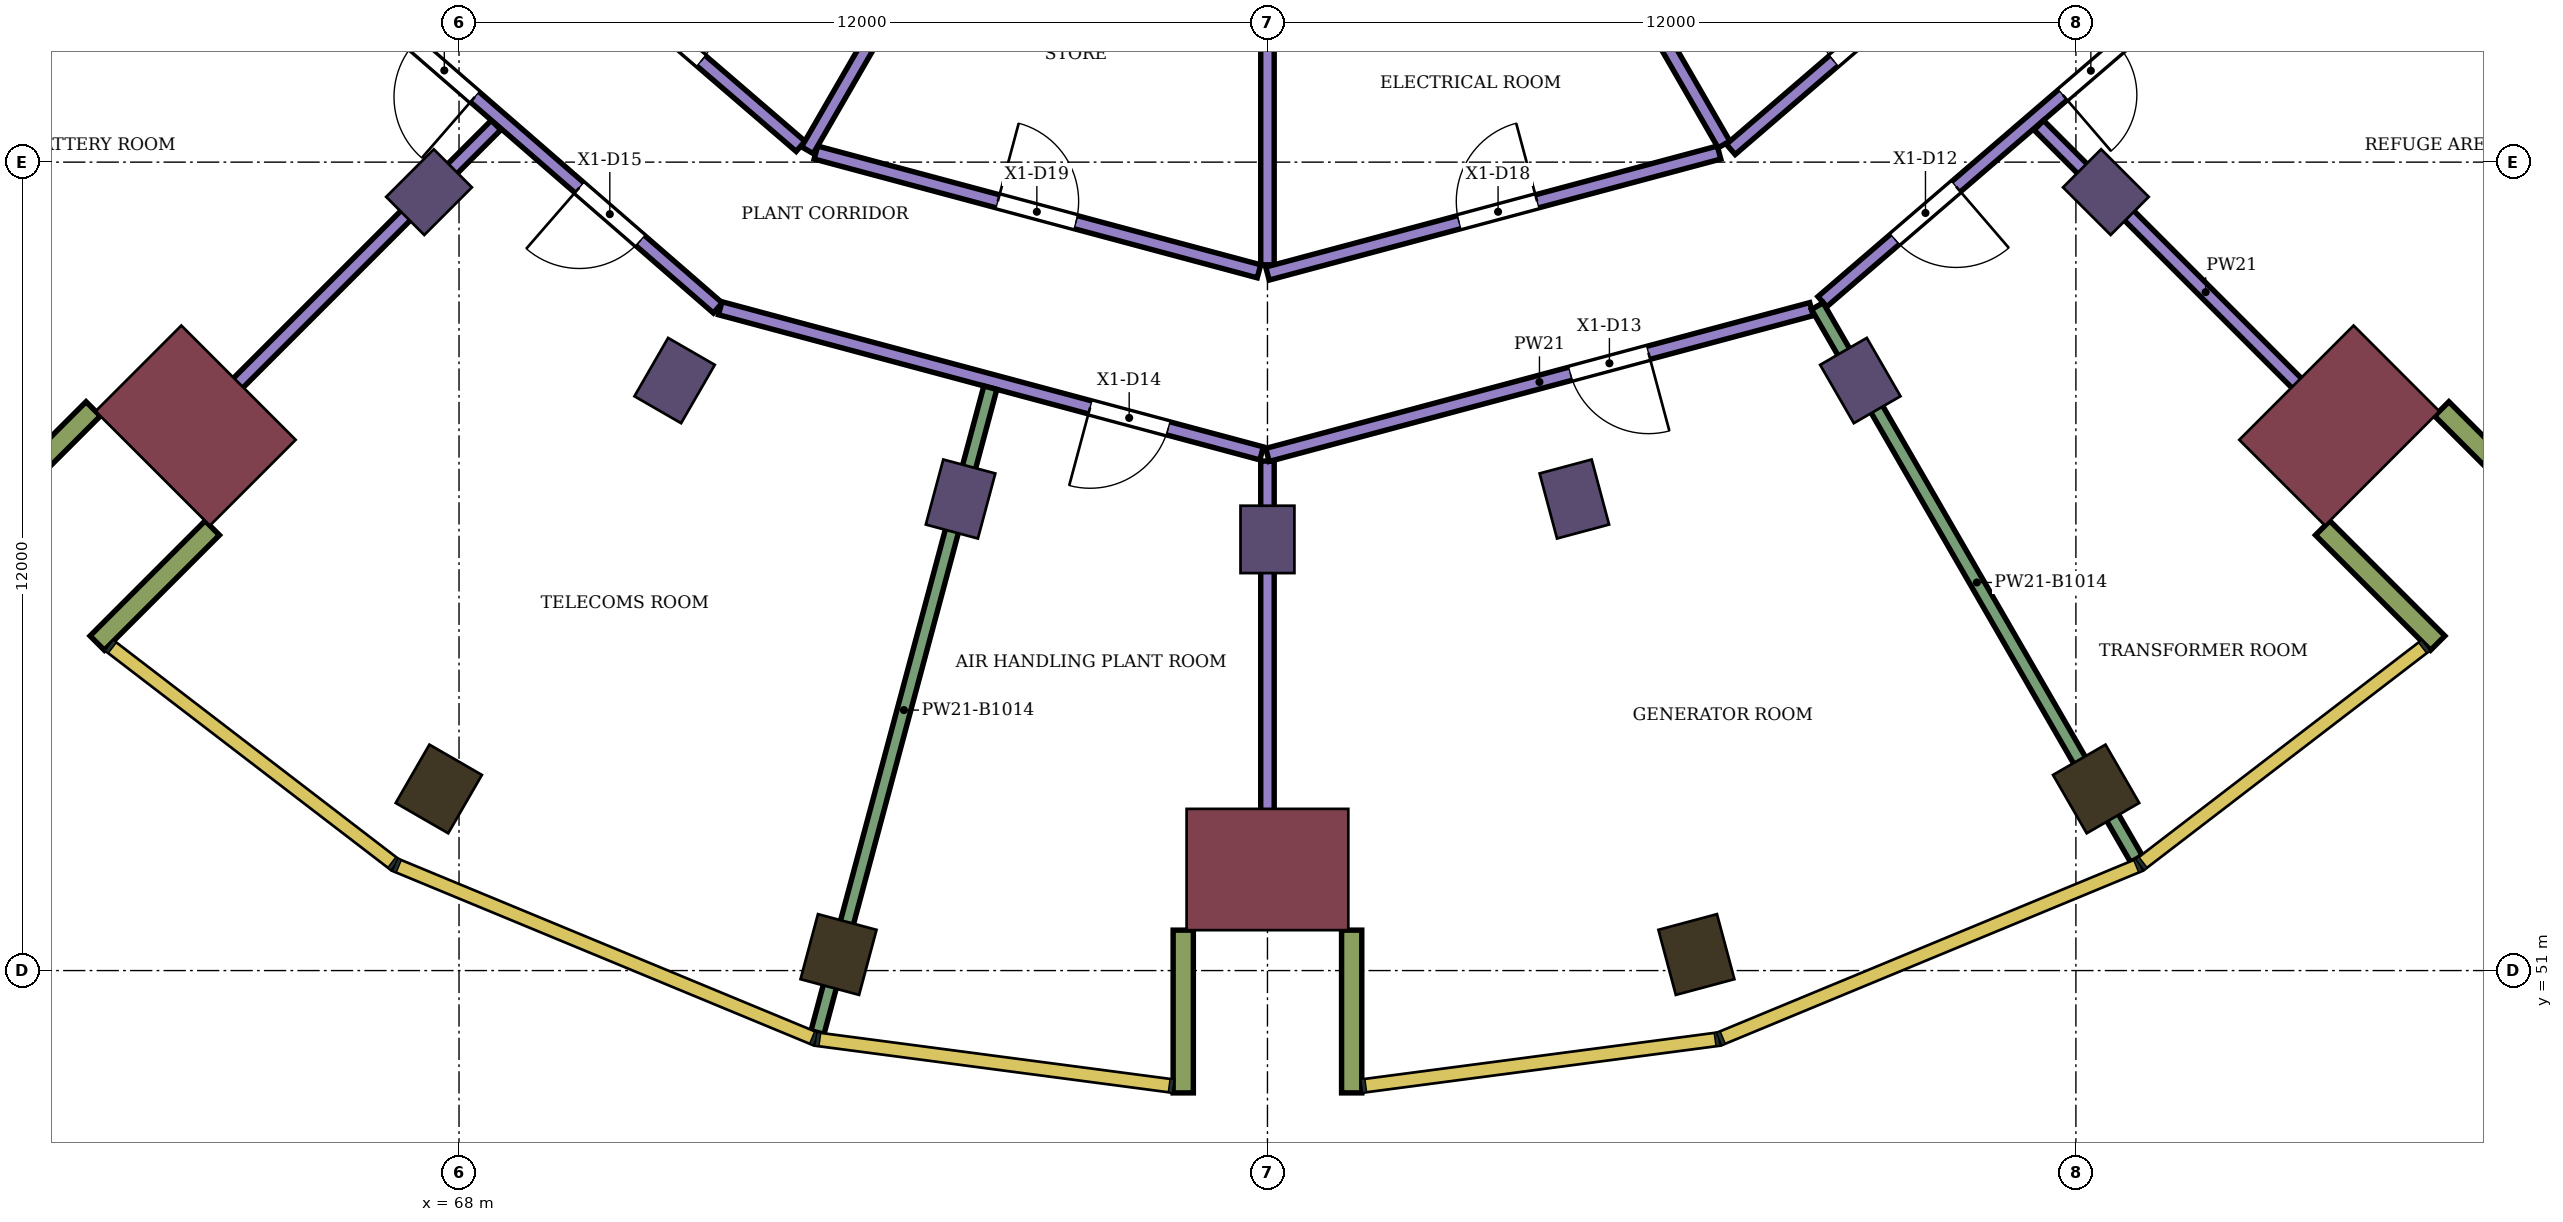
"""IFC4 building model, lengths in metres.
Left out: names, types, materials, properties, quantities, classifications, styles, units other than length and angle.
Written with IfcOpenShell. Run it as: python <this file> out.ifc"""

import sys

from ifc_helpers import new_model, si_unit, direction, frame, frame_2d, origin, origin_2d, place, context, subcontext, project, spatial, rectangle, extrude, element, fill, save


model = new_model("IFC4")
c1 = context("Model", 3, precision=1e-05, world=origin(), true_north=direction((0.0, 1.0)))
c2 = subcontext(c1, "Body", "Model", "MODEL_VIEW")
j1 = project(units=[si_unit("LENGTHUNIT", "METRE"), si_unit("PLANEANGLEUNIT", "RADIAN")], contexts=[c1])
p1 = place(None, origin())
s1 = spatial("IfcSite", under=j1, at=p1, CompositionType="ELEMENT")
p2 = place(p1, origin())
s2 = spatial("IfcBuilding", under=s1, at=p2, CompositionType="ELEMENT")
p3 = place(p2, frame((0.0, 0.0, 109.0)))
s3 = spatial("IfcBuildingStorey", under=s2, at=p3, CompositionType="ELEMENT", Elevation=109.0)
for number, where, z_axis, x_axis in (
    (1, (67.7, 53.696, 0.0), (0.0, 0.0, 1.0), (-0.5, -0.866, 0.0)),
    (2, (73.633, 51.238, 0.0), (0.0, 0.0, 1.0), (-0.259, -0.966, 0.0)),
    (3, (86.367, 51.238, 0.0), (0.0, 0.0, 1.0), (0.259, -0.966, 0.0)),
    (4, (92.3, 53.696, 0.0), (0.0, 0.0, 1.0), (0.5, -0.866, 0.0)),
):
    element("IfcColumn", number, at=place(p3, frame(where, z_axis=z_axis, x_axis=x_axis)), inside=s3, PredefinedType="COLUMN", context=c2, shape_type="SweptSolid", body=[
        extrude(rectangle(XDim=1.0, YDim=0.9, at=origin_2d()), origin(), (0.0, 0.0, 1.0), 5.6),
    ])
for number, where, z_axis, x_axis in (
    (5, (67.555, 62.555, 0.0), (0.0, 0.0, 1.0), (-0.707, -0.707, 0.0)),
    (6, (71.2, 59.758, 0.0), (0.0, 0.0, 1.0), (-0.5, -0.866, 0.0)),
    (7, (75.445, 58.0, 0.0), (0.0, 0.0, 1.0), (-0.259, -0.966, 0.0)),
    (8, (80.0, 57.4, 0.0), (0.0, 0.0, 1.0), (0.0, -1.0, 0.0)),
    (9, (84.555, 58.0, 0.0), (0.0, 0.0, 1.0), (0.259, -0.966, 0.0)),
    (10, (88.8, 59.758, 0.0), (0.0, 0.0, 1.0), (0.5, -0.866, 0.0)),
    (11, (92.445, 62.555, 0.0), (0.0, 0.0, 1.0), (0.707, -0.707, 0.0)),
):
    element("IfcColumn", number, at=place(p3, frame(where, z_axis=z_axis, x_axis=x_axis)), inside=s3, PredefinedType="COLUMN", context=c2, shape_type="SweptSolid", body=[
        extrude(rectangle(XDim=1.0, YDim=0.8, at=origin_2d()), origin(), (0.0, 0.0, 1.0), 5.6),
    ])
for number, where, z_axis, x_axis in (
    (12, (64.09, 59.09, 0.0), (0.0, 0.0, 1.0), (-0.707, -0.707, 0.0)),
    (13, (80.0, 52.5, 0.0), (0.0, 0.0, 1.0), (0.0, -1.0, 0.0)),
    (14, (95.91, 59.09, 0.0), (0.0, 0.0, 1.0), (0.707, -0.707, 0.0)),
):
    element("IfcColumn", number, at=place(p3, frame(where, z_axis=z_axis, x_axis=x_axis)), inside=s3, PredefinedType="COLUMN", context=c2, shape_type="SweptSolid", body=[
        extrude(rectangle(XDim=1.8, YDim=2.4, at=origin_2d()), origin(), (0.0, 0.0, 1.0), 5.6),
    ])
for number, where, z_axis, x_axis in (
    (15, (62.57, 59.338, 0.0), (0.0, 0.0, 1.0), (-0.707, -0.707, 0.0)),
    (16, (64.338, 57.57, 0.0), (0.0, 0.0, 1.0), (-0.707, -0.707, 0.0)),
    (17, (78.75, 51.6, 0.0), (0.0, 0.0, 1.0), (0.0, -1.0, 0.0)),
    (18, (81.25, 51.6, 0.0), (0.0, 0.0, 1.0), (0.0, -1.0, 0.0)),
    (19, (95.662, 57.57, 0.0), (0.0, 0.0, 1.0), (0.707, -0.707, 0.0)),
    (20, (97.43, 59.338, 0.0), (0.0, 0.0, 1.0), (0.707, -0.707, 0.0)),
):
    element("IfcWall", number, at=place(p3, frame(where, z_axis=z_axis, x_axis=x_axis)), inside=s3, PredefinedType="NOTDEFINED", context=c2, shape_type="SweptSolid", body=[
        extrude(rectangle(XDim=2.416, YDim=0.3, at=frame_2d((1.208, 0.0))), origin(), (0.0, 0.0, 1.0), 5.6),
    ])
p4 = place(p3, frame((63.596, 58.596, 0.0), z_axis=(0.0, 0.0, 1.0), x_axis=(0.707106781187, 0.707106781187, 0.0)))
e21 = element("IfcWall", 21, at=p4, inside=s3, PredefinedType="PARTITIONING", context=c2, shape_type="SweptSolid", body=[
    extrude(rectangle(XDim=7.005, YDim=0.2, at=frame_2d((3.502, 0.0))), origin(), (0.0, 0.0, 1.0), 5.15),
])
p5 = place(p3, frame((66.922, 65.108, 0.0), z_axis=(0.0, 0.0, 1.0), x_axis=(0.755027260387, -0.655693400968, 0.0)))
e22 = element("IfcWall", 22, at=p5, inside=s3, PredefinedType="PARTITIONING", context=c2, shape_type="SweptSolid", body=[
    extrude(rectangle(XDim=6.516, YDim=0.2, at=frame_2d((3.258, 0.0))), origin(), (0.0, 0.0, 1.0), 5.15),
])
p6 = place(p5, frame((3.792, 0.0, 0.0)))
e23 = element("IfcOpeningElement", 23, at=p6, cuts=e22, PredefinedType="OPENING", context=c2, shape_type="SweptSolid", body=[
    extrude(rectangle(XDim=1.2, YDim=2.4, at=frame_2d((0.6, 1.2))), frame((0.0, 0.11, 0.0), z_axis=(0.0, -1.0, 0.0), x_axis=(1.0, 0.0, 0.0)), (0.0, 0.0, 1.0), 0.22),
])
p7 = place(p5, frame((0.539, 0.0, 0.0)))
e24 = element("IfcOpeningElement", 24, at=p7, cuts=e22, PredefinedType="OPENING", context=c2, shape_type="SweptSolid", body=[
    extrude(rectangle(XDim=1.2, YDim=2.4, at=frame_2d((0.6, 1.2))), frame((0.0, 0.11, 0.0), z_axis=(0.0, -1.0, 0.0), x_axis=(1.0, 0.0, 0.0)), (0.0, 0.0, 1.0), 0.22),
])
p8 = place(p3, frame((69.158, 66.6, 0.0), z_axis=(0.0, 0.0, 1.0), x_axis=(0.758063092745, -0.652181222835, 0.0)))
e25 = element("IfcWall", 25, at=p8, inside=s3, PredefinedType="PARTITIONING", context=c2, shape_type="SweptSolid", body=[
    extrude(rectangle(XDim=5.16, YDim=0.2, at=frame_2d((2.58, 0.0))), origin(), (0.0, 0.0, 1.0), 5.15),
])
p9 = place(p8, frame((2.015, 0.0, 0.0)))
e26 = element("IfcOpeningElement", 26, at=p9, cuts=e25, PredefinedType="OPENING", context=c2, shape_type="SweptSolid", body=[
    extrude(rectangle(XDim=1.2, YDim=2.4, at=frame_2d((0.6, 1.2))), frame((0.0, 0.11, 0.0), z_axis=(0.0, -1.0, 0.0), x_axis=(1.0, 0.0, 0.0)), (0.0, 0.0, 1.0), 0.22),
])
p10 = place(p3, frame((71.877, 60.831, 0.0), z_axis=(0.0, 0.0, 1.0), x_axis=(0.965893155099, -0.258940944876, 0.0)))
e27 = element("IfcWall", 27, at=p10, inside=s3, PredefinedType="PARTITIONING", context=c2, shape_type="SweptSolid", body=[
    extrude(rectangle(XDim=8.32, YDim=0.2, at=frame_2d((4.16, 0.0))), origin(), (0.0, 0.0, 1.0), 5.15),
])
p11 = place(p10, frame((5.685, 0.0, 0.0)))
e28 = element("IfcOpeningElement", 28, at=p11, cuts=e27, PredefinedType="OPENING", context=c2, shape_type="SweptSolid", body=[
    extrude(rectangle(XDim=1.2, YDim=2.4, at=frame_2d((0.6, 1.2))), frame((0.0, 0.11, 0.0), z_axis=(0.0, -1.0, 0.0), x_axis=(1.0, 0.0, 0.0)), (0.0, 0.0, 1.0), 0.22),
])
p12 = place(p3, frame((73.297, 63.143, 0.0), z_axis=(0.0, 0.0, 1.0), x_axis=(0.965899714105, -0.258916477443, 0.0)))
e29 = element("IfcWall", 29, at=p12, inside=s3, PredefinedType="PARTITIONING", context=c2, shape_type="SweptSolid", body=[
    extrude(rectangle(XDim=6.81, YDim=0.2, at=frame_2d((3.405, 0.0))), origin(), (0.0, 0.0, 1.0), 5.15),
])
p13 = place(p12, frame((2.796, 0.0, 0.0)))
e30 = element("IfcOpeningElement", 30, at=p13, cuts=e29, PredefinedType="OPENING", context=c2, shape_type="SweptSolid", body=[
    extrude(rectangle(XDim=1.2, YDim=2.4, at=frame_2d((0.6, 1.2))), frame((0.0, 0.11, 0.0), z_axis=(0.0, -1.0, 0.0), x_axis=(1.0, 0.0, 0.0)), (0.0, 0.0, 1.0), 0.22),
])
p14 = place(p3, frame((73.172, 63.177, 0.0), z_axis=(0.0, 0.0, 1.0), x_axis=(0.500080872431, 0.86597870703, 0.0)))
e31 = element("IfcWall", 31, at=p14, inside=s3, PredefinedType="PARTITIONING", context=c2, shape_type="SweptSolid", body=[
    extrude(rectangle(XDim=5.955, YDim=0.2, at=frame_2d((2.978, 0.0))), origin(), (0.0, 0.0, 1.0), 5.15),
])
p15 = place(p3, frame((73.321, 50.081, 0.0), z_axis=(0.0, 0.0, 1.0), x_axis=(0.258890856201, 0.965906581702, 0.0)))
e32 = element("IfcWall", 32, at=p15, inside=s3, PredefinedType="PARTITIONING", context=c2, shape_type="SweptSolid", body=[
    extrude(rectangle(XDim=9.908, YDim=0.2, at=frame_2d((4.954, 0.0))), origin(), (0.0, 0.0, 1.0), 4.586),
])
p16 = place(p3, frame((80.0, 51.801, 0.0), z_axis=(0.0, 0.0, 1.0), x_axis=(0.0, 1.0, 0.0)))
e33 = element("IfcWall", 33, at=p16, inside=s3, PredefinedType="PARTITIONING", context=c2, shape_type="SweptSolid", body=[
    extrude(rectangle(XDim=6.762, YDim=0.2, at=frame_2d((3.381, 0.0))), origin(), (0.0, 0.0, 1.0), 5.15),
])
p17 = place(p3, frame((80.0, 58.654, 0.0), z_axis=(0.0, 0.0, 1.0), x_axis=(0.965905026676, 0.258896657842, 0.0)))
e34 = element("IfcWall", 34, at=p17, inside=s3, PredefinedType="PARTITIONING", context=c2, shape_type="SweptSolid", body=[
    extrude(rectangle(XDim=8.36, YDim=0.2, at=frame_2d((4.18, 0.0))), origin(), (0.0, 0.0, 1.0), 5.15),
])
p18 = place(p17, frame((4.655, 0.0, 0.0)))
e35 = element("IfcOpeningElement", 35, at=p18, cuts=e34, PredefinedType="OPENING", context=c2, shape_type="SweptSolid", body=[
    extrude(rectangle(XDim=1.2, YDim=2.4, at=frame_2d((0.6, 1.2))), frame((0.0, 0.11, 0.0), z_axis=(0.0, -1.0, 0.0), x_axis=(1.0, 0.0, 0.0)), (0.0, 0.0, 1.0), 0.22),
])
p19 = place(p3, frame((80.0, 61.476, 0.0), z_axis=(0.0, 0.0, 1.0), x_axis=(0.0, 1.0, 0.0)))
e36 = element("IfcWall", 36, at=p19, inside=s3, PredefinedType="PARTITIONING", context=c2, shape_type="SweptSolid", body=[
    extrude(rectangle(XDim=5.825, YDim=0.2, at=frame_2d((2.913, 0.0))), origin(), (0.0, 0.0, 1.0), 5.15),
])
p20 = place(p3, frame((80.0, 61.346, 0.0), z_axis=(0.0, 0.0, 1.0), x_axis=(0.965915385935, 0.25885800589, 0.0)))
e37 = element("IfcWall", 37, at=p20, inside=s3, PredefinedType="PARTITIONING", context=c2, shape_type="SweptSolid", body=[
    extrude(rectangle(XDim=6.94, YDim=0.2, at=frame_2d((3.47, 0.0))), origin(), (0.0, 0.0, 1.0), 5.15),
])
p21 = place(p20, frame((2.944, 0.0, 0.0)))
e38 = element("IfcOpeningElement", 38, at=p21, cuts=e37, PredefinedType="OPENING", context=c2, shape_type="SweptSolid", body=[
    extrude(rectangle(XDim=1.2, YDim=2.4, at=frame_2d((0.6, 1.2))), frame((0.0, 0.11, 0.0), z_axis=(0.0, -1.0, 0.0), x_axis=(1.0, 0.0, 0.0)), (0.0, 0.0, 1.0), 0.22),
])
p22 = place(p3, frame((83.849, 68.333, 0.0), z_axis=(0.0, 0.0, 1.0), x_axis=(0.499951054106, -0.866053660865, 0.0)))
e39 = element("IfcWall", 39, at=p22, inside=s3, PredefinedType="PARTITIONING", context=c2, shape_type="SweptSolid", body=[
    extrude(rectangle(XDim=5.855, YDim=0.2, at=frame_2d((2.927, 0.0))), origin(), (0.0, 0.0, 1.0), 5.15),
])
p23 = place(p3, frame((86.877, 63.189, 0.0), z_axis=(0.0, 0.0, 1.0), x_axis=(0.758075808328, 0.652166442581, 0.0)))
e40 = element("IfcWall", 40, at=p23, inside=s3, PredefinedType="PARTITIONING", context=c2, shape_type="SweptSolid", body=[
    extrude(rectangle(XDim=5.23, YDim=0.2, at=frame_2d((2.615, 0.0))), origin(), (0.0, 0.0, 1.0), 5.15),
])
p24 = place(p23, frame((2.015, 0.0, 0.0)))
e41 = element("IfcOpeningElement", 41, at=p24, cuts=e40, PredefinedType="OPENING", context=c2, shape_type="SweptSolid", body=[
    extrude(rectangle(XDim=1.2, YDim=2.4, at=frame_2d((0.6, 1.2))), frame((0.0, 0.11, 0.0), z_axis=(0.0, -1.0, 0.0), x_axis=(1.0, 0.0, 0.0)), (0.0, 0.0, 1.0), 0.22),
])
p25 = place(p3, frame((88.237, 60.929, 0.0), z_axis=(0.0, 0.0, 1.0), x_axis=(0.758121184653, 0.6521136936, 0.0)))
e42 = element("IfcWall", 42, at=p25, inside=s3, PredefinedType="PARTITIONING", context=c2, shape_type="SweptSolid", body=[
    extrude(rectangle(XDim=6.336, YDim=0.2, at=frame_2d((3.168, 0.0))), origin(), (0.0, 0.0, 1.0), 5.15),
])
p26 = place(p25, frame((4.707, 0.0, 0.0)))
e43 = element("IfcOpeningElement", 43, at=p26, cuts=e42, PredefinedType="OPENING", context=c2, shape_type="SweptSolid", body=[
    extrude(rectangle(XDim=1.1, YDim=2.1, at=frame_2d((0.55, 1.05))), frame((0.0, 0.11, 0.0), z_axis=(0.0, -1.0, 0.0), x_axis=(1.0, 0.0, 0.0)), (0.0, 0.0, 1.0), 0.22),
])
p27 = place(p25, frame((1.419, 0.0, 0.0)))
e44 = element("IfcOpeningElement", 44, at=p27, cuts=e42, PredefinedType="OPENING", context=c2, shape_type="SweptSolid", body=[
    extrude(rectangle(XDim=1.2, YDim=2.4, at=frame_2d((0.6, 1.2))), frame((0.0, 0.11, 0.0), z_axis=(0.0, -1.0, 0.0), x_axis=(1.0, 0.0, 0.0)), (0.0, 0.0, 1.0), 0.22),
])
p28 = place(p3, frame((88.162, 60.863, 0.0), z_axis=(0.0, 0.0, 1.0), x_axis=(0.499991628305, -0.866030237131, 0.0)))
e45 = element("IfcWall", 45, at=p28, inside=s3, PredefinedType="PARTITIONING", context=c2, shape_type="SweptSolid", body=[
    extrude(rectangle(XDim=9.474, YDim=0.2, at=frame_2d((4.737, 0.0))), origin(), (0.0, 0.0, 1.0), 4.586),
])
p29 = place(p3, frame((91.45, 63.548, 0.0), z_axis=(0.0, 0.0, 1.0), x_axis=(0.707037084594, -0.70717647091, 0.0)))
e46 = element("IfcWall", 46, at=p29, inside=s3, PredefinedType="PARTITIONING", context=c2, shape_type="SweptSolid", body=[
    extrude(rectangle(XDim=7.006, YDim=0.2, at=frame_2d((3.503, 0.0))), origin(), (0.0, 0.0, 1.0), 5.15),
])
p30 = place(p26, frame((1.1, 0.0, 0.0), z_axis=(0.0, 0.0, 1.0), x_axis=(-1.0, 0.0, 0.0)))
e47 = element("IfcDoor", 47, at=p30, inside=s3, OperationType="SINGLE_SWING_RIGHT", PredefinedType="DOOR", context=c2, shape_type="SweptSolid", body=[
    extrude(rectangle(XDim=1.1, YDim=2.1, at=frame_2d((0.55, 1.05))), frame((0.0, 0.025, 0.0), z_axis=(0.0, -1.0, 0.0), x_axis=(1.0, 0.0, 0.0)), (0.0, 0.0, 1.0), 0.05),
])
fill(e43, e47)
p31 = place(p27, frame((1.2, 0.0, 0.0), z_axis=(0.0, 0.0, 1.0), x_axis=(-1.0, 0.0, 0.0)))
e48 = element("IfcDoor", 48, at=p31, inside=s3, OperationType="SINGLE_SWING_LEFT", PredefinedType="DOOR", context=c2, shape_type="SweptSolid", body=[
    extrude(rectangle(XDim=1.2, YDim=2.4, at=frame_2d((0.6, 1.2))), frame((0.0, 0.025, 0.0), z_axis=(0.0, -1.0, 0.0), x_axis=(1.0, 0.0, 0.0)), (0.0, 0.0, 1.0), 0.05),
])
fill(e44, e48)
p32 = place(p18, frame((1.2, 0.0, 0.0), z_axis=(0.0, 0.0, 1.0), x_axis=(-1.0, 0.0, 0.0)))
e49 = element("IfcDoor", 49, at=p32, inside=s3, OperationType="SINGLE_SWING_LEFT", PredefinedType="DOOR", context=c2, shape_type="SweptSolid", body=[
    extrude(rectangle(XDim=1.2, YDim=2.4, at=frame_2d((0.6, 1.2))), frame((0.0, 0.025, 0.0), z_axis=(0.0, -1.0, 0.0), x_axis=(1.0, 0.0, 0.0)), (0.0, 0.0, 1.0), 0.05),
])
fill(e35, e49)
p33 = place(p11, frame((1.2, 0.0, 0.0), z_axis=(0.0, 0.0, 1.0), x_axis=(-1.0, 0.0, 0.0)))
e50 = element("IfcDoor", 50, at=p33, inside=s3, OperationType="SINGLE_SWING_RIGHT", PredefinedType="DOOR", context=c2, shape_type="SweptSolid", body=[
    extrude(rectangle(XDim=1.2, YDim=2.4, at=frame_2d((0.6, 1.2))), frame((0.0, 0.025, 0.0), z_axis=(0.0, -1.0, 0.0), x_axis=(1.0, 0.0, 0.0)), (0.0, 0.0, 1.0), 0.05),
])
fill(e28, e50)
p34 = place(p6, frame((1.2, 0.0, 0.0), z_axis=(0.0, 0.0, 1.0), x_axis=(-1.0, 0.0, 0.0)))
e51 = element("IfcDoor", 51, at=p34, inside=s3, OperationType="SINGLE_SWING_RIGHT", PredefinedType="DOOR", context=c2, shape_type="SweptSolid", body=[
    extrude(rectangle(XDim=1.2, YDim=2.4, at=frame_2d((0.6, 1.2))), frame((0.0, 0.025, 0.0), z_axis=(0.0, -1.0, 0.0), x_axis=(1.0, 0.0, 0.0)), (0.0, 0.0, 1.0), 0.05),
])
fill(e23, e51)
p35 = place(p7, frame((1.2, 0.0, 0.0), z_axis=(0.0, 0.0, 1.0), x_axis=(-1.0, 0.0, 0.0)))
e52 = element("IfcDoor", 52, at=p35, inside=s3, OperationType="SINGLE_SWING_LEFT", PredefinedType="DOOR", context=c2, shape_type="SweptSolid", body=[
    extrude(rectangle(XDim=1.2, YDim=2.4, at=frame_2d((0.6, 1.2))), frame((0.0, 0.025, 0.0), z_axis=(0.0, -1.0, 0.0), x_axis=(1.0, 0.0, 0.0)), (0.0, 0.0, 1.0), 0.05),
])
fill(e24, e52)
p36 = place(p24, origin())
e53 = element("IfcDoor", 53, at=p36, inside=s3, OperationType="SINGLE_SWING_RIGHT", PredefinedType="DOOR", context=c2, shape_type="SweptSolid", body=[
    extrude(rectangle(XDim=1.2, YDim=2.4, at=frame_2d((0.6, 1.2))), frame((0.0, 0.025, 0.0), z_axis=(0.0, -1.0, 0.0), x_axis=(1.0, 0.0, 0.0)), (0.0, 0.0, 1.0), 0.05),
])
fill(e41, e53)
p37 = place(p21, origin())
e54 = element("IfcDoor", 54, at=p37, inside=s3, OperationType="SINGLE_SWING_RIGHT", PredefinedType="DOOR", context=c2, shape_type="SweptSolid", body=[
    extrude(rectangle(XDim=1.2, YDim=2.4, at=frame_2d((0.6, 1.2))), frame((0.0, 0.025, 0.0), z_axis=(0.0, -1.0, 0.0), x_axis=(1.0, 0.0, 0.0)), (0.0, 0.0, 1.0), 0.05),
])
fill(e38, e54)
p38 = place(p13, origin())
e55 = element("IfcDoor", 55, at=p38, inside=s3, OperationType="SINGLE_SWING_LEFT", PredefinedType="DOOR", context=c2, shape_type="SweptSolid", body=[
    extrude(rectangle(XDim=1.2, YDim=2.4, at=frame_2d((0.6, 1.2))), frame((0.0, 0.025, 0.0), z_axis=(0.0, -1.0, 0.0), x_axis=(1.0, 0.0, 0.0)), (0.0, 0.0, 1.0), 0.05),
])
fill(e30, e55)
p39 = place(p9, origin())
e56 = element("IfcDoor", 56, at=p39, inside=s3, OperationType="SINGLE_SWING_LEFT", PredefinedType="DOOR", context=c2, shape_type="SweptSolid", body=[
    extrude(rectangle(XDim=1.2, YDim=2.4, at=frame_2d((0.6, 1.2))), frame((0.0, 0.025, 0.0), z_axis=(0.0, -1.0, 0.0), x_axis=(1.0, 0.0, 0.0)), (0.0, 0.0, 1.0), 0.05),
])
fill(e26, e56)
save(model, sys.argv[1])
